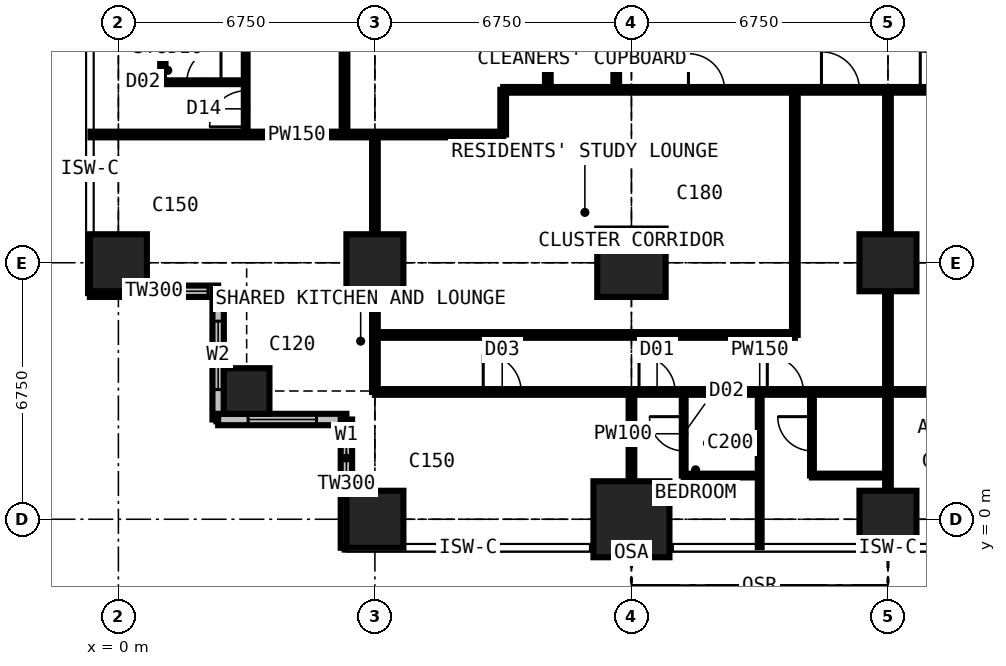
"""IFC4 building model, lengths in metres.
Left out: names, types, materials, properties, quantities, classifications, styles, units other than length and angle.
Written with IfcOpenShell. Run it as: python <this file> out.ifc"""

import sys

from ifc_helpers import new_model, si_unit, direction, frame, frame_2d, origin, origin_2d, place, context, subcontext, project, spatial, rectangle, extrude, element, fill, save


model = new_model("IFC4")
c1 = context("Model", 3, precision=1e-05, world=origin(), true_north=direction((0.0, 1.0)))
c2 = subcontext(c1, "Body", "Model", "MODEL_VIEW")
j1 = project(units=[si_unit("LENGTHUNIT", "METRE"), si_unit("PLANEANGLEUNIT", "RADIAN")], contexts=[c1])
p1 = place(None, origin())
s1 = spatial("IfcSite", under=j1, at=p1, CompositionType="ELEMENT")
p2 = place(p1, origin())
s2 = spatial("IfcBuilding", under=s1, at=p2, CompositionType="ELEMENT")
p3 = place(p2, frame((0.0, 0.0, 145.8)))
s3 = spatial("IfcBuildingStorey", under=s2, at=p3, CompositionType="ELEMENT", Elevation=145.8)
p4 = place(p3, frame((0.0, 6.75, 0.0), z_axis=(0.0, 0.0, 1.0), x_axis=(1.0, 0.0, 0.0)))
e1 = element("IfcColumn", 1, at=p4, inside=s3, PredefinedType="COLUMN", context=c2, shape_type="SweptSolid", body=[
    extrude(rectangle(XDim=1.5, YDim=1.5, at=origin_2d()), origin(), (0.0, 0.0, 1.0), 3.6),
])
p5 = place(p3, frame((3.375, 3.375, 0.0), z_axis=(0.0, 0.0, 1.0), x_axis=(1.0, 0.0, 0.0)))
e2 = element("IfcColumn", 2, at=p5, inside=s3, PredefinedType="COLUMN", context=c2, shape_type="SweptSolid", body=[
    extrude(rectangle(XDim=1.2, YDim=1.2, at=origin_2d()), origin(), (0.0, 0.0, 1.0), 3.6),
])
for number, where, z_axis, x_axis in (
    (3, (6.75, 0.0, 0.0), (0.0, 0.0, 1.0), (1.0, 0.0, 0.0)),
    (4, (6.75, 6.75, 0.0), (0.0, 0.0, 1.0), (1.0, 0.0, 0.0)),
):
    element("IfcColumn", number, at=place(p3, frame(where, z_axis=z_axis, x_axis=x_axis)), inside=s3, PredefinedType="COLUMN", context=c2, shape_type="SweptSolid", body=[
        extrude(rectangle(XDim=1.5, YDim=1.5, at=origin_2d()), origin(), (0.0, 0.0, 1.0), 3.6),
    ])
p6 = place(p3, frame((13.5, 0.0, 0.0), z_axis=(0.0, 0.0, 1.0), x_axis=(1.0, 0.0, 0.0)))
e5 = element("IfcColumn", 5, at=p6, inside=s3, PredefinedType="COLUMN", context=c2, shape_type="SweptSolid", body=[
    extrude(rectangle(XDim=2.0, YDim=2.0, at=origin_2d()), origin(), (0.0, 0.0, 1.0), 3.6),
])
p7 = place(p3, frame((13.5, 6.75, 0.0), z_axis=(0.0, 0.0, 1.0), x_axis=(1.0, 0.0, 0.0)))
e6 = element("IfcColumn", 6, at=p7, inside=s3, PredefinedType="COLUMN", context=c2, shape_type="SweptSolid", body=[
    extrude(rectangle(XDim=1.8, YDim=1.8, at=origin_2d()), origin(), (0.0, 0.0, 1.0), 3.6),
])
for number, where, z_axis, x_axis in (
    (7, (20.25, 0.0, 0.0), (0.0, 0.0, 1.0), (1.0, 0.0, 0.0)),
    (8, (20.25, 6.75, 0.0), (0.0, 0.0, 1.0), (1.0, 0.0, 0.0)),
):
    element("IfcColumn", number, at=place(p3, frame(where, z_axis=z_axis, x_axis=x_axis)), inside=s3, PredefinedType="COLUMN", context=c2, shape_type="SweptSolid", body=[
        extrude(rectangle(XDim=1.5, YDim=1.5, at=origin_2d()), origin(), (0.0, 0.0, 1.0), 3.6),
    ])
p8 = place(p3, frame((-0.75, 6.0, 0.0), z_axis=(0.0, 0.0, 1.0), x_axis=(1.0, 0.0, 0.0)))
e9 = element("IfcWall", 9, at=p8, inside=s3, PredefinedType="SOLIDWALL", context=c2, shape_type="SweptSolid", body=[
    extrude(rectangle(XDim=3.375, YDim=0.3, at=frame_2d((1.688, 0.0))), origin(), (0.0, 0.0, 1.0), 3.375),
])
p9 = place(p8, frame((1.607, 0.0, 0.9)))
e10 = element("IfcOpeningElement", 10, at=p9, cuts=e9, PredefinedType="OPENING", context=c2, shape_type="SweptSolid", body=[
    extrude(rectangle(XDim=1.5, YDim=1.8, at=frame_2d((0.75, 0.9))), frame((0.0, 0.16, 0.0), z_axis=(0.0, -1.0, 0.0), x_axis=(1.0, 0.0, 0.0)), (0.0, 0.0, 1.0), 0.32),
])
p10 = place(p3, frame((2.625, 6.0, 0.0), z_axis=(0.0, 0.0, 1.0), x_axis=(0.0, -1.0, 0.0)))
e11 = element("IfcWall", 11, at=p10, inside=s3, PredefinedType="SOLIDWALL", context=c2, shape_type="SweptSolid", body=[
    extrude(rectangle(XDim=3.375, YDim=0.3, at=frame_2d((1.688, 0.0))), origin(), (0.0, 0.0, 1.0), 3.375),
])
p11 = place(p10, frame((0.788, 0.0, 0.6)))
e12 = element("IfcOpeningElement", 12, at=p11, cuts=e11, PredefinedType="OPENING", context=c2, shape_type="SweptSolid", body=[
    extrude(rectangle(XDim=1.8, YDim=2.1, at=frame_2d((0.9, 1.05))), frame((0.0, 0.16, 0.0), z_axis=(0.0, -1.0, 0.0), x_axis=(1.0, 0.0, 0.0)), (0.0, 0.0, 1.0), 0.32),
])
p12 = place(p3, frame((2.625, 2.625, 0.0), z_axis=(0.0, 0.0, 1.0), x_axis=(1.0, 0.0, 0.0)))
e13 = element("IfcWall", 13, at=p12, inside=s3, PredefinedType="SOLIDWALL", context=c2, shape_type="SweptSolid", body=[
    extrude(rectangle(XDim=3.375, YDim=0.3, at=frame_2d((1.688, 0.0))), origin(), (0.0, 0.0, 1.0), 3.375),
])
p13 = place(p12, frame((0.788, 0.0, 0.6)))
e14 = element("IfcOpeningElement", 14, at=p13, cuts=e13, PredefinedType="OPENING", context=c2, shape_type="SweptSolid", body=[
    extrude(rectangle(XDim=1.8, YDim=2.1, at=frame_2d((0.9, 1.05))), frame((0.0, 0.16, 0.0), z_axis=(0.0, -1.0, 0.0), x_axis=(1.0, 0.0, 0.0)), (0.0, 0.0, 1.0), 0.32),
])
p14 = place(p3, frame((6.0, 2.625, 0.0), z_axis=(0.0, 0.0, 1.0), x_axis=(0.0, -1.0, 0.0)))
e15 = element("IfcWall", 15, at=p14, inside=s3, PredefinedType="SOLIDWALL", context=c2, shape_type="SweptSolid", body=[
    extrude(rectangle(XDim=3.375, YDim=0.3, at=frame_2d((1.688, 0.0))), origin(), (0.0, 0.0, 1.0), 3.375),
])
p15 = place(p14, frame((0.268, 0.0, 0.9)))
e16 = element("IfcOpeningElement", 16, at=p15, cuts=e15, PredefinedType="OPENING", context=c2, shape_type="SweptSolid", body=[
    extrude(rectangle(XDim=1.5, YDim=1.8, at=frame_2d((0.75, 0.9))), frame((0.0, 0.16, 0.0), z_axis=(0.0, -1.0, 0.0), x_axis=(1.0, 0.0, 0.0)), (0.0, 0.0, 1.0), 0.32),
])
p16 = place(p3, frame((-0.734, 10.125, 0.0), z_axis=(0.0, 0.0, 1.0), x_axis=(1.0, 0.0, 0.0)))
e17 = element("IfcWall", 17, at=p16, inside=s3, PredefinedType="PARTITIONING", context=c2, shape_type="SweptSolid", body=[
    extrude(rectangle(XDim=10.859, YDim=0.15, at=frame_2d((5.429, 0.0))), origin(), (0.0, 0.0, 1.0), 3.375),
])
p17 = place(p3, frame((1.15, 11.5, 0.0), z_axis=(0.0, 0.0, 1.0), x_axis=(0.0, 1.0, 0.0)))
e18 = element("IfcWall", 18, at=p17, inside=s3, PredefinedType="PARTITIONING", context=c2, shape_type="SweptSolid", body=[
    extrude(rectangle(XDim=2.0, YDim=0.1, at=frame_2d((1.0, 0.0))), origin(), (0.0, 0.0, 1.0), 3.375),
])
p18 = place(p3, frame((1.15, 11.5, 0.0), z_axis=(0.0, 0.0, 1.0), x_axis=(1.0, 0.0, 0.0)))
e19 = element("IfcWall", 19, at=p18, inside=s3, PredefinedType="PARTITIONING", context=c2, shape_type="SweptSolid", body=[
    extrude(rectangle(XDim=2.2, YDim=0.1, at=frame_2d((1.1, 0.0))), origin(), (0.0, 0.0, 1.0), 3.375),
])
p19 = place(p18, frame((0.65, 0.0, 0.0)))
e20 = element("IfcOpeningElement", 20, at=p19, cuts=e19, PredefinedType="OPENING", context=c2, shape_type="SweptSolid", body=[
    extrude(rectangle(XDim=0.9, YDim=2.2, at=frame_2d((0.45, 1.1))), frame((0.0, 0.06, 0.0), z_axis=(0.0, -1.0, 0.0), x_axis=(1.0, 0.0, 0.0)), (0.0, 0.0, 1.0), 0.12),
])
p20 = place(p3, frame((3.35, 10.125, 0.0), z_axis=(0.0, 0.0, 1.0), x_axis=(0.0, 1.0, 0.0)))
e21 = element("IfcWall", 21, at=p20, inside=s3, PredefinedType="PARTITIONING", context=c2, shape_type="SweptSolid", body=[
    extrude(rectangle(XDim=16.875, YDim=0.1, at=frame_2d((8.438, 0.0))), origin(), (0.0, 0.0, 1.0), 3.375),
])
p21 = place(p20, frame((0.2, 0.0, 0.0)))
e22 = element("IfcOpeningElement", 22, at=p21, cuts=e21, PredefinedType="OPENING", context=c2, shape_type="SweptSolid", body=[
    extrude(rectangle(XDim=0.95, YDim=2.2, at=frame_2d((0.475, 1.1))), frame((0.0, 0.06, 0.0), z_axis=(0.0, -1.0, 0.0), x_axis=(1.0, 0.0, 0.0)), (0.0, 0.0, 1.0), 0.12),
])
p22 = place(p20, frame((3.575, 0.0, 0.0)))
e23 = element("IfcOpeningElement", 23, at=p22, cuts=e21, PredefinedType="OPENING", context=c2, shape_type="SweptSolid", body=[
    extrude(rectangle(XDim=0.95, YDim=2.2, at=frame_2d((0.475, 1.1))), frame((0.0, 0.06, 0.0), z_axis=(0.0, -1.0, 0.0), x_axis=(1.0, 0.0, 0.0)), (0.0, 0.0, 1.0), 0.12),
])
p23 = place(p20, frame((6.95, 0.0, 0.0)))
e24 = element("IfcOpeningElement", 24, at=p23, cuts=e21, PredefinedType="OPENING", context=c2, shape_type="SweptSolid", body=[
    extrude(rectangle(XDim=0.95, YDim=2.2, at=frame_2d((0.475, 1.1))), frame((0.0, 0.06, 0.0), z_axis=(0.0, -1.0, 0.0), x_axis=(1.0, 0.0, 0.0)), (0.0, 0.0, 1.0), 0.12),
])
p24 = place(p3, frame((5.95, 10.125, 0.0), z_axis=(0.0, 0.0, 1.0), x_axis=(0.0, 1.0, 0.0)))
e25 = element("IfcWall", 25, at=p24, inside=s3, PredefinedType="PARTITIONING", context=c2, shape_type="SweptSolid", body=[
    extrude(rectangle(XDim=2.65, YDim=0.15, at=frame_2d((1.325, 0.0))), origin(), (0.0, 0.0, 1.0), 3.375),
])
p25 = place(p3, frame((6.75, 3.35, 0.0), z_axis=(0.0, 0.0, 1.0), x_axis=(0.0, 1.0, 0.0)))
e26 = element("IfcWall", 26, at=p25, inside=s3, PredefinedType="PARTITIONING", context=c2, shape_type="SweptSolid", body=[
    extrude(rectangle(XDim=6.775, YDim=0.15, at=frame_2d((3.387, 0.0))), origin(), (0.0, 0.0, 1.0), 2.877),
])
p26 = place(p3, frame((6.75, 3.35, 0.0), z_axis=(0.0, 0.0, 1.0), x_axis=(1.0, 0.0, 0.0)))
e27 = element("IfcWall", 27, at=p26, inside=s3, PredefinedType="PARTITIONING", context=c2, shape_type="SweptSolid", body=[
    extrude(rectangle(XDim=20.25, YDim=0.15, at=frame_2d((10.125, 0.0))), origin(), (0.0, 0.0, 1.0), 3.375),
])
p27 = place(p26, frame((2.85, 0.0, 0.0)))
e28 = element("IfcOpeningElement", 28, at=p27, cuts=e27, PredefinedType="OPENING", context=c2, shape_type="SweptSolid", body=[
    extrude(rectangle(XDim=1.0, YDim=2.2, at=frame_2d((0.5, 1.1))), frame((0.0, 0.085, 0.0), z_axis=(0.0, -1.0, 0.0), x_axis=(1.0, 0.0, 0.0)), (0.0, 0.0, 1.0), 0.17),
])
p28 = place(p26, frame((6.95, 0.0, 0.0)))
e29 = element("IfcOpeningElement", 29, at=p28, cuts=e27, PredefinedType="OPENING", context=c2, shape_type="SweptSolid", body=[
    extrude(rectangle(XDim=0.95, YDim=2.2, at=frame_2d((0.475, 1.1))), frame((0.0, 0.085, 0.0), z_axis=(0.0, -1.0, 0.0), x_axis=(1.0, 0.0, 0.0)), (0.0, 0.0, 1.0), 0.17),
])
p29 = place(p26, frame((10.325, 0.0, 0.0)))
e30 = element("IfcOpeningElement", 30, at=p29, cuts=e27, PredefinedType="OPENING", context=c2, shape_type="SweptSolid", body=[
    extrude(rectangle(XDim=0.95, YDim=2.2, at=frame_2d((0.475, 1.1))), frame((0.0, 0.085, 0.0), z_axis=(0.0, -1.0, 0.0), x_axis=(1.0, 0.0, 0.0)), (0.0, 0.0, 1.0), 0.17),
])
p30 = place(p26, frame((15.1, 0.0, 0.0)))
e31 = element("IfcOpeningElement", 31, at=p30, cuts=e27, PredefinedType="OPENING", context=c2, shape_type="SweptSolid", body=[
    extrude(rectangle(XDim=0.95, YDim=2.2, at=frame_2d((0.475, 1.1))), frame((0.0, 0.085, 0.0), z_axis=(0.0, -1.0, 0.0), x_axis=(1.0, 0.0, 0.0)), (0.0, 0.0, 1.0), 0.17),
])
p31 = place(p3, frame((6.75, 4.85, 0.0), z_axis=(0.0, 0.0, 1.0), x_axis=(1.0, 0.0, 0.0)))
e32 = element("IfcWall", 32, at=p31, inside=s3, PredefinedType="PARTITIONING", context=c2, shape_type="SweptSolid", body=[
    extrude(rectangle(XDim=11.05, YDim=0.15, at=frame_2d((5.525, 0.0))), origin(), (0.0, 0.0, 1.0), 3.375),
])
p32 = place(p3, frame((10.125, 10.125, 0.0), z_axis=(0.0, 0.0, 1.0), x_axis=(0.0, 1.0, 0.0)))
e33 = element("IfcWall", 33, at=p32, inside=s3, PredefinedType="PARTITIONING", context=c2, shape_type="SweptSolid", body=[
    extrude(rectangle(XDim=1.175, YDim=0.15, at=frame_2d((0.587, 0.0))), origin(), (0.0, 0.0, 1.0), 3.375),
])
p33 = place(p3, frame((10.125, 11.3, 0.0), z_axis=(0.0, 0.0, 1.0), x_axis=(1.0, 0.0, 0.0)))
e34 = element("IfcWall", 34, at=p33, inside=s3, PredefinedType="PARTITIONING", context=c2, shape_type="SweptSolid", body=[
    extrude(rectangle(XDim=20.25, YDim=0.15, at=frame_2d((10.125, 0.0))), origin(), (0.0, 0.0, 1.0), 3.375),
])
p34 = place(p33, frame((8.375, 0.0, 0.0)))
e35 = element("IfcOpeningElement", 35, at=p34, cuts=e34, PredefinedType="OPENING", context=c2, shape_type="SweptSolid", body=[
    extrude(rectangle(XDim=1.0, YDim=2.2, at=frame_2d((0.5, 1.1))), frame((0.0, 0.085, 0.0), z_axis=(0.0, -1.0, 0.0), x_axis=(1.0, 0.0, 0.0)), (0.0, 0.0, 1.0), 0.17),
])
p35 = place(p33, frame((10.975, 0.0, 0.0)))
e36 = element("IfcOpeningElement", 36, at=p35, cuts=e34, PredefinedType="OPENING", context=c2, shape_type="SweptSolid", body=[
    extrude(rectangle(XDim=1.0, YDim=2.2, at=frame_2d((0.5, 1.1))), frame((0.0, 0.085, 0.0), z_axis=(0.0, -1.0, 0.0), x_axis=(1.0, 0.0, 0.0)), (0.0, 0.0, 1.0), 0.17),
])
p36 = place(p33, frame((4.875, 0.0, 0.0)))
e37 = element("IfcOpeningElement", 37, at=p36, cuts=e34, PredefinedType="OPENING", context=c2, shape_type="SweptSolid", body=[
    extrude(rectangle(XDim=0.95, YDim=2.2, at=frame_2d((0.475, 1.1))), frame((0.0, 0.085, 0.0), z_axis=(0.0, -1.0, 0.0), x_axis=(1.0, 0.0, 0.0)), (0.0, 0.0, 1.0), 0.17),
])
p37 = place(p3, frame((11.3, 11.3, 0.0), z_axis=(0.0, 0.0, 1.0), x_axis=(0.0, 1.0, 0.0)))
e38 = element("IfcWall", 38, at=p37, inside=s3, PredefinedType="PARTITIONING", context=c2, shape_type="SweptSolid", body=[
    extrude(rectangle(XDim=19.3, YDim=0.15, at=frame_2d((9.65, 0.0))), origin(), (0.0, 0.0, 1.0), 3.375),
])
p38 = place(p37, frame((18.1, 0.0, 0.0)))
e39 = element("IfcOpeningElement", 39, at=p38, cuts=e38, PredefinedType="OPENING", context=c2, shape_type="SweptSolid", body=[
    extrude(rectangle(XDim=1.0, YDim=2.2, at=frame_2d((0.5, 1.1))), frame((0.0, 0.085, 0.0), z_axis=(0.0, -1.0, 0.0), x_axis=(1.0, 0.0, 0.0)), (0.0, 0.0, 1.0), 0.17),
])
p39 = place(p37, frame((10.137, 0.0, 0.0)))
e40 = element("IfcOpeningElement", 40, at=p39, cuts=e38, PredefinedType="OPENING", context=c2, shape_type="SweptSolid", body=[
    extrude(rectangle(XDim=1.0, YDim=2.2, at=frame_2d((0.5, 1.1))), frame((0.0, 0.085, 0.0), z_axis=(0.0, -1.0, 0.0), x_axis=(1.0, 0.0, 0.0)), (0.0, 0.0, 1.0), 0.17),
])
p40 = place(p3, frame((13.1, 11.3, 0.0), z_axis=(0.0, 0.0, 1.0), x_axis=(0.0, 1.0, 0.0)))
e41 = element("IfcWall", 41, at=p40, inside=s3, PredefinedType="PARTITIONING", context=c2, shape_type="SweptSolid", body=[
    extrude(rectangle(XDim=1.6, YDim=0.15, at=frame_2d((0.8, 0.0))), origin(), (0.0, 0.0, 1.0), 3.375),
])
p41 = place(p3, frame((13.5, -0.734, 0.0), z_axis=(0.0, 0.0, 1.0), x_axis=(0.0, 1.0, 0.0)))
e42 = element("IfcWall", 42, at=p41, inside=s3, PredefinedType="PARTITIONING", context=c2, shape_type="SweptSolid", body=[
    extrude(rectangle(XDim=4.084, YDim=0.15, at=frame_2d((2.042, 0.0))), origin(), (0.0, 0.0, 1.0), 2.61),
])
p42 = place(p3, frame((14.875, 1.15, 0.0), z_axis=(0.0, 0.0, 1.0), x_axis=(0.0, 1.0, 0.0)))
e43 = element("IfcWall", 43, at=p42, inside=s3, PredefinedType="PARTITIONING", context=c2, shape_type="SweptSolid", body=[
    extrude(rectangle(XDim=2.2, YDim=0.1, at=frame_2d((1.1, 0.0))), origin(), (0.0, 0.0, 1.0), 3.375),
])
p43 = place(p42, frame((0.65, 0.0, 0.0)))
e44 = element("IfcOpeningElement", 44, at=p43, cuts=e43, PredefinedType="OPENING", context=c2, shape_type="SweptSolid", body=[
    extrude(rectangle(XDim=0.9, YDim=2.2, at=frame_2d((0.45, 1.1))), frame((0.0, 0.06, 0.0), z_axis=(0.0, -1.0, 0.0), x_axis=(1.0, 0.0, 0.0)), (0.0, 0.0, 1.0), 0.12),
])
p44 = place(p3, frame((14.875, 1.15, 0.0), z_axis=(0.0, 0.0, 1.0), x_axis=(1.0, 0.0, 0.0)))
e45 = element("IfcWall", 45, at=p44, inside=s3, PredefinedType="PARTITIONING", context=c2, shape_type="SweptSolid", body=[
    extrude(rectangle(XDim=2.0, YDim=0.1, at=frame_2d((1.0, 0.0))), origin(), (0.0, 0.0, 1.0), 3.375),
])
p45 = place(p3, frame((16.875, -0.734, 0.0), z_axis=(0.0, 0.0, 1.0), x_axis=(0.0, 1.0, 0.0)))
e46 = element("IfcWall", 46, at=p45, inside=s3, PredefinedType="PARTITIONING", context=c2, shape_type="SweptSolid", body=[
    extrude(rectangle(XDim=4.084, YDim=0.1, at=frame_2d((2.042, 0.0))), origin(), (0.0, 0.0, 1.0), 3.375),
])
p46 = place(p3, frame((17.8, 4.85, 0.0), z_axis=(0.0, 0.0, 1.0), x_axis=(0.0, 1.0, 0.0)))
e47 = element("IfcWall", 47, at=p46, inside=s3, PredefinedType="PARTITIONING", context=c2, shape_type="SweptSolid", body=[
    extrude(rectangle(XDim=6.45, YDim=0.15, at=frame_2d((3.225, 0.0))), origin(), (0.0, 0.0, 1.0), 3.375),
])
p47 = place(p3, frame((18.25, 1.15, 0.0), z_axis=(0.0, 0.0, 1.0), x_axis=(0.0, 1.0, 0.0)))
e48 = element("IfcWall", 48, at=p47, inside=s3, PredefinedType="PARTITIONING", context=c2, shape_type="SweptSolid", body=[
    extrude(rectangle(XDim=2.2, YDim=0.1, at=frame_2d((1.1, 0.0))), origin(), (0.0, 0.0, 1.0), 3.375),
])
p48 = place(p47, frame((0.65, 0.0, 0.0)))
e49 = element("IfcOpeningElement", 49, at=p48, cuts=e48, PredefinedType="OPENING", context=c2, shape_type="SweptSolid", body=[
    extrude(rectangle(XDim=0.9, YDim=2.2, at=frame_2d((0.45, 1.1))), frame((0.0, 0.06, 0.0), z_axis=(0.0, -1.0, 0.0), x_axis=(1.0, 0.0, 0.0)), (0.0, 0.0, 1.0), 0.12),
])
p49 = place(p3, frame((18.25, 1.15, 0.0), z_axis=(0.0, 0.0, 1.0), x_axis=(1.0, 0.0, 0.0)))
e50 = element("IfcWall", 50, at=p49, inside=s3, PredefinedType="PARTITIONING", context=c2, shape_type="SweptSolid", body=[
    extrude(rectangle(XDim=2.0, YDim=0.1, at=frame_2d((1.0, 0.0))), origin(), (0.0, 0.0, 1.0), 3.375),
])
p50 = place(p3, frame((20.25, -0.734, 0.0), z_axis=(0.0, 0.0, 1.0), x_axis=(0.0, 1.0, 0.0)))
e51 = element("IfcWall", 51, at=p50, inside=s3, PredefinedType="PARTITIONING", context=c2, shape_type="SweptSolid", body=[
    extrude(rectangle(XDim=12.034, YDim=0.15, at=frame_2d((6.017, 0.0))), origin(), (0.0, 0.0, 1.0), 2.61),
])
p51 = place(p9, origin())
e52 = element("IfcWindow", 52, at=p51, inside=s3, PartitioningType="SINGLE_PANEL", PredefinedType="WINDOW", context=c2, shape_type="SweptSolid", body=[
    extrude(rectangle(XDim=1.5, YDim=1.8, at=frame_2d((0.75, 0.9))), frame((0.0, 0.03, 0.0), z_axis=(0.0, -1.0, 0.0), x_axis=(1.0, 0.0, 0.0)), (0.0, 0.0, 1.0), 0.06),
])
fill(e10, e52)
p52 = place(p11, origin())
e53 = element("IfcWindow", 53, at=p52, inside=s3, PartitioningType="SINGLE_PANEL", PredefinedType="WINDOW", context=c2, shape_type="SweptSolid", body=[
    extrude(rectangle(XDim=1.8, YDim=2.1, at=frame_2d((0.9, 1.05))), frame((0.0, 0.03, 0.0), z_axis=(0.0, -1.0, 0.0), x_axis=(1.0, 0.0, 0.0)), (0.0, 0.0, 1.0), 0.06),
])
fill(e12, e53)
p53 = place(p13, origin())
e54 = element("IfcWindow", 54, at=p53, inside=s3, PartitioningType="SINGLE_PANEL", PredefinedType="WINDOW", context=c2, shape_type="SweptSolid", body=[
    extrude(rectangle(XDim=1.8, YDim=2.1, at=frame_2d((0.9, 1.05))), frame((0.0, 0.03, 0.0), z_axis=(0.0, -1.0, 0.0), x_axis=(1.0, 0.0, 0.0)), (0.0, 0.0, 1.0), 0.06),
])
fill(e14, e54)
p54 = place(p15, origin())
e55 = element("IfcWindow", 55, at=p54, inside=s3, PartitioningType="SINGLE_PANEL", PredefinedType="WINDOW", context=c2, shape_type="SweptSolid", body=[
    extrude(rectangle(XDim=1.5, YDim=1.8, at=frame_2d((0.75, 0.9))), frame((0.0, 0.03, 0.0), z_axis=(0.0, -1.0, 0.0), x_axis=(1.0, 0.0, 0.0)), (0.0, 0.0, 1.0), 0.06),
])
fill(e16, e55)
p55 = place(p27, origin())
e56 = element("IfcDoor", 56, at=p55, inside=s3, OperationType="SINGLE_SWING_LEFT", PredefinedType="DOOR", context=c2, shape_type="SweptSolid", body=[
    extrude(rectangle(XDim=1.0, YDim=2.2, at=frame_2d((0.5, 1.1))), frame((0.0, 0.025, 0.0), z_axis=(0.0, -1.0, 0.0), x_axis=(1.0, 0.0, 0.0)), (0.0, 0.0, 1.0), 0.05),
])
fill(e28, e56)
p56 = place(p28, origin())
e57 = element("IfcDoor", 57, at=p56, inside=s3, OperationType="SINGLE_SWING_LEFT", PredefinedType="DOOR", context=c2, shape_type="SweptSolid", body=[
    extrude(rectangle(XDim=0.95, YDim=2.2, at=frame_2d((0.475, 1.1))), frame((0.0, 0.025, 0.0), z_axis=(0.0, -1.0, 0.0), x_axis=(1.0, 0.0, 0.0)), (0.0, 0.0, 1.0), 0.05),
])
fill(e29, e57)
p57 = place(p43, origin())
e58 = element("IfcDoor", 58, at=p57, inside=s3, OperationType="SINGLE_SWING_RIGHT", PredefinedType="DOOR", context=c2, shape_type="SweptSolid", body=[
    extrude(rectangle(XDim=0.9, YDim=2.2, at=frame_2d((0.45, 1.1))), frame((0.0, 0.025, 0.0), z_axis=(0.0, -1.0, 0.0), x_axis=(1.0, 0.0, 0.0)), (0.0, 0.0, 1.0), 0.05),
])
fill(e44, e58)
p58 = place(p29, origin())
e59 = element("IfcDoor", 59, at=p58, inside=s3, OperationType="SINGLE_SWING_LEFT", PredefinedType="DOOR", context=c2, shape_type="SweptSolid", body=[
    extrude(rectangle(XDim=0.95, YDim=2.2, at=frame_2d((0.475, 1.1))), frame((0.0, 0.025, 0.0), z_axis=(0.0, -1.0, 0.0), x_axis=(1.0, 0.0, 0.0)), (0.0, 0.0, 1.0), 0.05),
])
fill(e30, e59)
p59 = place(p48, origin())
e60 = element("IfcDoor", 60, at=p59, inside=s3, OperationType="SINGLE_SWING_RIGHT", PredefinedType="DOOR", context=c2, shape_type="SweptSolid", body=[
    extrude(rectangle(XDim=0.9, YDim=2.2, at=frame_2d((0.45, 1.1))), frame((0.0, 0.025, 0.0), z_axis=(0.0, -1.0, 0.0), x_axis=(1.0, 0.0, 0.0)), (0.0, 0.0, 1.0), 0.05),
])
fill(e49, e60)
p60 = place(p34, origin())
e61 = element("IfcDoor", 61, at=p60, inside=s3, OperationType="SINGLE_SWING_LEFT", PredefinedType="DOOR", context=c2, shape_type="SweptSolid", body=[
    extrude(rectangle(XDim=1.0, YDim=2.2, at=frame_2d((0.5, 1.1))), frame((0.0, 0.025, 0.0), z_axis=(0.0, -1.0, 0.0), x_axis=(1.0, 0.0, 0.0)), (0.0, 0.0, 1.0), 0.05),
])
fill(e35, e61)
p61 = place(p35, origin())
e62 = element("IfcDoor", 62, at=p61, inside=s3, OperationType="SINGLE_SWING_LEFT", PredefinedType="DOOR", context=c2, shape_type="SweptSolid", body=[
    extrude(rectangle(XDim=1.0, YDim=2.2, at=frame_2d((0.5, 1.1))), frame((0.0, 0.025, 0.0), z_axis=(0.0, -1.0, 0.0), x_axis=(1.0, 0.0, 0.0)), (0.0, 0.0, 1.0), 0.05),
])
fill(e36, e62)
p62 = place(p36, origin())
e63 = element("IfcDoor", 63, at=p62, inside=s3, OperationType="SINGLE_SWING_LEFT", PredefinedType="DOOR", context=c2, shape_type="SweptSolid", body=[
    extrude(rectangle(XDim=0.95, YDim=2.2, at=frame_2d((0.475, 1.1))), frame((0.0, 0.025, 0.0), z_axis=(0.0, -1.0, 0.0), x_axis=(1.0, 0.0, 0.0)), (0.0, 0.0, 1.0), 0.05),
])
fill(e37, e63)
p63 = place(p21, origin())
e64 = element("IfcDoor", 64, at=p63, inside=s3, OperationType="SINGLE_SWING_LEFT", PredefinedType="DOOR", context=c2, shape_type="SweptSolid", body=[
    extrude(rectangle(XDim=0.95, YDim=2.2, at=frame_2d((0.475, 1.1))), frame((0.0, 0.025, 0.0), z_axis=(0.0, -1.0, 0.0), x_axis=(1.0, 0.0, 0.0)), (0.0, 0.0, 1.0), 0.05),
])
fill(e22, e64)
p64 = place(p19, origin())
e65 = element("IfcDoor", 65, at=p64, inside=s3, OperationType="SINGLE_SWING_RIGHT", PredefinedType="DOOR", context=c2, shape_type="SweptSolid", body=[
    extrude(rectangle(XDim=0.9, YDim=2.2, at=frame_2d((0.45, 1.1))), frame((0.0, 0.025, 0.0), z_axis=(0.0, -1.0, 0.0), x_axis=(1.0, 0.0, 0.0)), (0.0, 0.0, 1.0), 0.05),
])
fill(e20, e65)
save(model, sys.argv[1])
